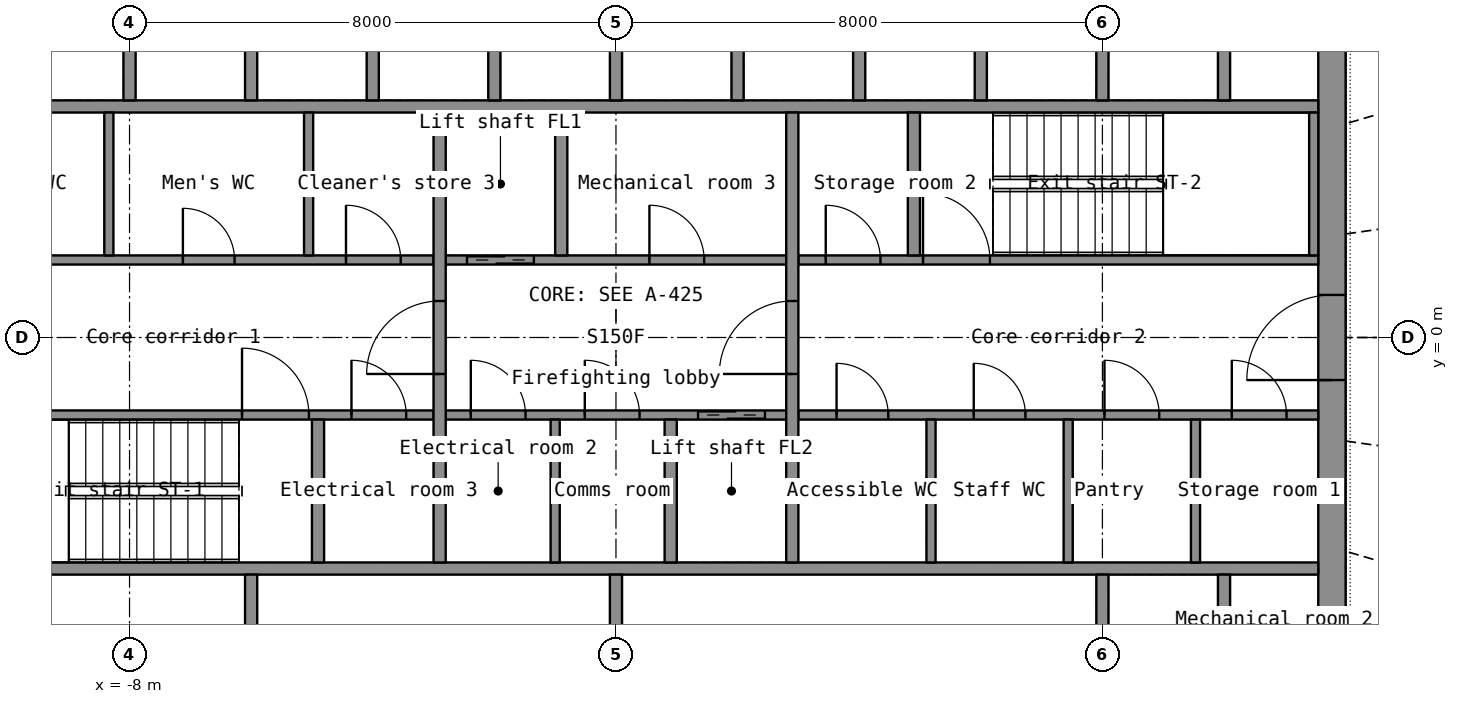
"""IFC4 building model, lengths in metres.
Left out: names, types, materials, properties, quantities, classifications, styles, units other than length and angle.
Written with IfcOpenShell. Run it as: python <this file> out.ifc"""

import sys

from ifc_helpers import new_model, si_unit, direction, frame, frame_2d, origin, place, context, subcontext, project, spatial, rectangle, extrude, element, fill, save


model = new_model("IFC4")
c1 = context("Model", 3, precision=1e-05, world=origin(), true_north=direction((0.0, 1.0)))
c2 = subcontext(c1, "Body", "Model", "MODEL_VIEW")
j1 = project(units=[si_unit("LENGTHUNIT", "METRE"), si_unit("PLANEANGLEUNIT", "RADIAN")], contexts=[c1])
p1 = place(None, origin())
s1 = spatial("IfcSite", under=j1, at=p1, CompositionType="ELEMENT")
p2 = place(p1, origin())
s2 = spatial("IfcBuilding", under=s1, at=p2, CompositionType="ELEMENT")
p3 = place(p2, frame((0.0, 0.0, 194.1)))
s3 = spatial("IfcBuildingStorey", under=s2, at=p3, CompositionType="ELEMENT", Elevation=194.1)
p4 = place(p3, frame((11.775, -7.2, 0.0), z_axis=(0.0, 0.0, 1.0), x_axis=(0.0, 1.0, 0.0)))
e1 = element("IfcWall", 1, at=p4, inside=s3, PredefinedType="SHEAR", context=c2, shape_type="SweptSolid", body=[
    extrude(rectangle(XDim=14.4, YDim=0.45, at=frame_2d((7.2, 0.0))), origin(), (0.0, 0.0, 1.0), 3.3),
])
p5 = place(p4, frame((6.5, 0.0, 0.0)))
e2 = element("IfcOpeningElement", 2, at=p5, cuts=e1, PredefinedType="OPENING", context=c2, shape_type="SweptSolid", body=[
    extrude(rectangle(XDim=1.4, YDim=2.2, at=frame_2d((0.7, 1.1))), frame((0.0, 0.235, 0.0), z_axis=(0.0, -1.0, 0.0), x_axis=(1.0, 0.0, 0.0)), (0.0, 0.0, 1.0), 0.47),
])
for number, where, z_axis, x_axis in (
    (3, (-11.55, -3.8, 0.0), (0.0, 0.0, 1.0), (1.0, 0.0, 0.0)),
    (4, (-11.55, 3.8, 0.0), (0.0, 0.0, 1.0), (1.0, 0.0, 0.0)),
):
    element("IfcWall", number, at=place(p3, frame(where, z_axis=z_axis, x_axis=x_axis)), inside=s3, PredefinedType="SHEAR", context=c2, shape_type="SweptSolid", body=[
        extrude(rectangle(XDim=23.1, YDim=0.2, at=frame_2d((11.55, 0.0))), origin(), (0.0, 0.0, 1.0), 3.3),
    ])
for number, where, z_axis, x_axis in (
    (5, (8.0, -6.75, 0.0), (0.0, 0.0, 1.0), (0.0, 1.0, 0.0)),
    (6, (10.0, -6.75, 0.0), (0.0, 0.0, 1.0), (0.0, 1.0, 0.0)),
):
    element("IfcWall", number, at=place(p3, frame(where, z_axis=z_axis, x_axis=x_axis)), inside=s3, PredefinedType="SHEAR", context=c2, shape_type="SweptSolid", body=[
        extrude(rectangle(XDim=2.85, YDim=0.2, at=frame_2d((1.425, 0.0))), origin(), (0.0, 0.0, 1.0), 3.3),
    ])
for number, where, z_axis, x_axis in (
    (7, (-6.0, -6.75, 0.0), (0.0, 0.0, 1.0), (0.0, 1.0, 0.0)),
    (8, (0.0, -6.75, 0.0), (0.0, 0.0, 1.0), (0.0, 1.0, 0.0)),
):
    element("IfcWall", number, at=place(p3, frame(where, z_axis=z_axis, x_axis=x_axis)), inside=s3, PredefinedType="PARTITIONING", context=c2, shape_type="SweptSolid", body=[
        extrude(rectangle(XDim=2.85, YDim=0.2, at=frame_2d((1.425, 0.0))), origin(), (0.0, 0.0, 1.0), 3.3),
    ])
for number, where, z_axis, x_axis in (
    (9, (-8.0, 3.9, 0.0), (0.0, 0.0, 1.0), (0.0, 1.0, 0.0)),
    (10, (-6.0, 3.9, 0.0), (0.0, 0.0, 1.0), (0.0, 1.0, 0.0)),
    (11, (-4.0, 3.9, 0.0), (0.0, 0.0, 1.0), (0.0, 1.0, 0.0)),
    (12, (-2.0, 3.9, 0.0), (0.0, 0.0, 1.0), (0.0, 1.0, 0.0)),
    (13, (0.0, 3.9, 0.0), (0.0, 0.0, 1.0), (0.0, 1.0, 0.0)),
    (14, (2.0, 3.9, 0.0), (0.0, 0.0, 1.0), (0.0, 1.0, 0.0)),
    (15, (4.0, 3.9, 0.0), (0.0, 0.0, 1.0), (0.0, 1.0, 0.0)),
    (16, (6.0, 3.9, 0.0), (0.0, 0.0, 1.0), (0.0, 1.0, 0.0)),
    (17, (8.0, 3.9, 0.0), (0.0, 0.0, 1.0), (0.0, 1.0, 0.0)),
    (18, (10.0, 3.9, 0.0), (0.0, 0.0, 1.0), (0.0, 1.0, 0.0)),
):
    element("IfcWall", number, at=place(p3, frame(where, z_axis=z_axis, x_axis=x_axis)), inside=s3, PredefinedType="SHEAR", context=c2, shape_type="SweptSolid", body=[
        extrude(rectangle(XDim=2.85, YDim=0.2, at=frame_2d((1.425, 0.0))), origin(), (0.0, 0.0, 1.0), 3.3),
    ])
p6 = place(p3, frame((-11.55, -1.275, 0.0), z_axis=(0.0, 0.0, 1.0), x_axis=(1.0, 0.0, 0.0)))
e19 = element("IfcWall", 19, at=p6, inside=s3, PredefinedType="SHEAR", context=c2, shape_type="SweptSolid", body=[
    extrude(rectangle(XDim=8.55, YDim=0.15, at=frame_2d((4.275, 0.0))), origin(), (0.0, 0.0, 1.0), 3.3),
])
p7 = place(p6, frame((5.4, 0.0, 0.0)))
e20 = element("IfcOpeningElement", 20, at=p7, cuts=e19, PredefinedType="OPENING", context=c2, shape_type="SweptSolid", body=[
    extrude(rectangle(XDim=1.1, YDim=2.15, at=frame_2d((0.55, 1.075))), frame((0.0, 0.085, 0.0), z_axis=(0.0, -1.0, 0.0), x_axis=(1.0, 0.0, 0.0)), (0.0, 0.0, 1.0), 0.17),
])
p8 = place(p6, frame((7.2, 0.0, 0.0)))
e21 = element("IfcOpeningElement", 21, at=p8, cuts=e19, PredefinedType="OPENING", context=c2, shape_type="SweptSolid", body=[
    extrude(rectangle(XDim=0.9, YDim=2.1, at=frame_2d((0.45, 1.05))), frame((0.0, 0.085, 0.0), z_axis=(0.0, -1.0, 0.0), x_axis=(1.0, 0.0, 0.0)), (0.0, 0.0, 1.0), 0.17),
])
p9 = place(p3, frame((-2.8, -1.275, 0.0), z_axis=(0.0, 0.0, 1.0), x_axis=(1.0, 0.0, 0.0)))
e22 = element("IfcWall", 22, at=p9, inside=s3, PredefinedType="SHEAR", context=c2, shape_type="SweptSolid", body=[
    extrude(rectangle(XDim=5.6, YDim=0.15, at=frame_2d((2.8, 0.0))), origin(), (0.0, 0.0, 1.0), 3.3),
])
p10 = place(p9, frame((4.15, 0.0, 0.0)))
e23 = element("IfcOpeningElement", 23, at=p10, cuts=e22, PredefinedType="OPENING", context=c2, shape_type="SweptSolid", body=[
    extrude(rectangle(XDim=1.1, YDim=2.2, at=frame_2d((0.55, 1.1))), frame((0.0, 0.085, 0.0), z_axis=(0.0, -1.0, 0.0), x_axis=(1.0, 0.0, 0.0)), (0.0, 0.0, 1.0), 0.17),
])
p11 = place(p9, frame((0.413, 0.0, 0.0)))
e24 = element("IfcOpeningElement", 24, at=p11, cuts=e22, PredefinedType="OPENING", context=c2, shape_type="SweptSolid", body=[
    extrude(rectangle(XDim=0.9, YDim=2.1, at=frame_2d((0.45, 1.05))), frame((0.0, 0.085, 0.0), z_axis=(0.0, -1.0, 0.0), x_axis=(1.0, 0.0, 0.0)), (0.0, 0.0, 1.0), 0.17),
])
p12 = place(p9, frame((2.288, 0.0, 0.0)))
e25 = element("IfcOpeningElement", 25, at=p12, cuts=e22, PredefinedType="OPENING", context=c2, shape_type="SweptSolid", body=[
    extrude(rectangle(XDim=0.9, YDim=2.1, at=frame_2d((0.45, 1.05))), frame((0.0, 0.085, 0.0), z_axis=(0.0, -1.0, 0.0), x_axis=(1.0, 0.0, 0.0)), (0.0, 0.0, 1.0), 0.17),
])
p13 = place(p3, frame((3.0, -1.275, 0.0), z_axis=(0.0, 0.0, 1.0), x_axis=(1.0, 0.0, 0.0)))
e26 = element("IfcWall", 26, at=p13, inside=s3, PredefinedType="PARTITIONING", context=c2, shape_type="SweptSolid", body=[
    extrude(rectangle(XDim=8.55, YDim=0.15, at=frame_2d((4.275, 0.0))), origin(), (0.0, 0.0, 1.0), 3.3),
])
p14 = place(p13, frame((0.628, 0.0, 0.0)))
e27 = element("IfcOpeningElement", 27, at=p14, cuts=e26, PredefinedType="OPENING", context=c2, shape_type="SweptSolid", body=[
    extrude(rectangle(XDim=0.85, YDim=2.1, at=frame_2d((0.425, 1.05))), frame((0.0, 0.085, 0.0), z_axis=(0.0, -1.0, 0.0), x_axis=(1.0, 0.0, 0.0)), (0.0, 0.0, 1.0), 0.17),
])
p15 = place(p13, frame((2.884, 0.0, 0.0)))
e28 = element("IfcOpeningElement", 28, at=p15, cuts=e26, PredefinedType="OPENING", context=c2, shape_type="SweptSolid", body=[
    extrude(rectangle(XDim=0.85, YDim=2.1, at=frame_2d((0.425, 1.05))), frame((0.0, 0.085, 0.0), z_axis=(0.0, -1.0, 0.0), x_axis=(1.0, 0.0, 0.0)), (0.0, 0.0, 1.0), 0.17),
])
p16 = place(p13, frame((5.034, 0.0, 0.0)))
e29 = element("IfcOpeningElement", 29, at=p16, cuts=e26, PredefinedType="OPENING", context=c2, shape_type="SweptSolid", body=[
    extrude(rectangle(XDim=0.9, YDim=2.1, at=frame_2d((0.45, 1.05))), frame((0.0, 0.085, 0.0), z_axis=(0.0, -1.0, 0.0), x_axis=(1.0, 0.0, 0.0)), (0.0, 0.0, 1.0), 0.17),
])
p17 = place(p13, frame((7.128, 0.0, 0.0)))
e30 = element("IfcOpeningElement", 30, at=p17, cuts=e26, PredefinedType="OPENING", context=c2, shape_type="SweptSolid", body=[
    extrude(rectangle(XDim=0.9, YDim=2.1, at=frame_2d((0.45, 1.05))), frame((0.0, 0.085, 0.0), z_axis=(0.0, -1.0, 0.0), x_axis=(1.0, 0.0, 0.0)), (0.0, 0.0, 1.0), 0.17),
])
p18 = place(p3, frame((-11.55, 1.275, 0.0), z_axis=(0.0, 0.0, 1.0), x_axis=(1.0, 0.0, 0.0)))
e31 = element("IfcWall", 31, at=p18, inside=s3, PredefinedType="PARTITIONING", context=c2, shape_type="SweptSolid", body=[
    extrude(rectangle(XDim=8.55, YDim=0.15, at=frame_2d((4.275, 0.0))), origin(), (0.0, 0.0, 1.0), 3.3),
])
p19 = place(p18, frame((1.143, 0.0, 0.0)))
e32 = element("IfcOpeningElement", 32, at=p19, cuts=e31, PredefinedType="OPENING", context=c2, shape_type="SweptSolid", body=[
    extrude(rectangle(XDim=0.85, YDim=2.1, at=frame_2d((0.425, 1.05))), frame((0.0, 0.085, 0.0), z_axis=(0.0, -1.0, 0.0), x_axis=(1.0, 0.0, 0.0)), (0.0, 0.0, 1.0), 0.17),
])
p20 = place(p18, frame((4.427, 0.0, 0.0)))
e33 = element("IfcOpeningElement", 33, at=p20, cuts=e31, PredefinedType="OPENING", context=c2, shape_type="SweptSolid", body=[
    extrude(rectangle(XDim=0.85, YDim=2.1, at=frame_2d((0.425, 1.05))), frame((0.0, 0.085, 0.0), z_axis=(0.0, -1.0, 0.0), x_axis=(1.0, 0.0, 0.0)), (0.0, 0.0, 1.0), 0.17),
])
p21 = place(p18, frame((7.11, 0.0, 0.0)))
e34 = element("IfcOpeningElement", 34, at=p21, cuts=e31, PredefinedType="OPENING", context=c2, shape_type="SweptSolid", body=[
    extrude(rectangle(XDim=0.9, YDim=2.1, at=frame_2d((0.45, 1.05))), frame((0.0, 0.085, 0.0), z_axis=(0.0, -1.0, 0.0), x_axis=(1.0, 0.0, 0.0)), (0.0, 0.0, 1.0), 0.17),
])
p22 = place(p3, frame((-2.8, 1.275, 0.0), z_axis=(0.0, 0.0, 1.0), x_axis=(1.0, 0.0, 0.0)))
e35 = element("IfcWall", 35, at=p22, inside=s3, PredefinedType="SHEAR", context=c2, shape_type="SweptSolid", body=[
    extrude(rectangle(XDim=5.6, YDim=0.15, at=frame_2d((2.8, 0.0))), origin(), (0.0, 0.0, 1.0), 3.3),
])
p23 = place(p22, frame((0.35, 0.0, 0.0)))
e36 = element("IfcOpeningElement", 36, at=p23, cuts=e35, PredefinedType="OPENING", context=c2, shape_type="SweptSolid", body=[
    extrude(rectangle(XDim=1.1, YDim=2.2, at=frame_2d((0.55, 1.1))), frame((0.0, 0.085, 0.0), z_axis=(0.0, -1.0, 0.0), x_axis=(1.0, 0.0, 0.0)), (0.0, 0.0, 1.0), 0.17),
])
p24 = place(p22, frame((3.35, 0.0, 0.0)))
e37 = element("IfcOpeningElement", 37, at=p24, cuts=e35, PredefinedType="OPENING", context=c2, shape_type="SweptSolid", body=[
    extrude(rectangle(XDim=0.9, YDim=2.1, at=frame_2d((0.45, 1.05))), frame((0.0, 0.085, 0.0), z_axis=(0.0, -1.0, 0.0), x_axis=(1.0, 0.0, 0.0)), (0.0, 0.0, 1.0), 0.17),
])
p25 = place(p3, frame((3.0, 1.275, 0.0), z_axis=(0.0, 0.0, 1.0), x_axis=(1.0, 0.0, 0.0)))
e38 = element("IfcWall", 38, at=p25, inside=s3, PredefinedType="SHEAR", context=c2, shape_type="SweptSolid", body=[
    extrude(rectangle(XDim=8.55, YDim=0.15, at=frame_2d((4.275, 0.0))), origin(), (0.0, 0.0, 1.0), 3.3),
])
p26 = place(p25, frame((2.05, 0.0, 0.0)))
e39 = element("IfcOpeningElement", 39, at=p26, cuts=e38, PredefinedType="OPENING", context=c2, shape_type="SweptSolid", body=[
    extrude(rectangle(XDim=1.1, YDim=2.15, at=frame_2d((0.55, 1.075))), frame((0.0, 0.085, 0.0), z_axis=(0.0, -1.0, 0.0), x_axis=(1.0, 0.0, 0.0)), (0.0, 0.0, 1.0), 0.17),
])
p27 = place(p25, frame((0.45, 0.0, 0.0)))
e40 = element("IfcOpeningElement", 40, at=p27, cuts=e38, PredefinedType="OPENING", context=c2, shape_type="SweptSolid", body=[
    extrude(rectangle(XDim=0.9, YDim=2.1, at=frame_2d((0.45, 1.05))), frame((0.0, 0.085, 0.0), z_axis=(0.0, -1.0, 0.0), x_axis=(1.0, 0.0, 0.0)), (0.0, 0.0, 1.0), 0.17),
])
p28 = place(p3, frame((-2.9, -3.7, 0.0), z_axis=(0.0, 0.0, 1.0), x_axis=(0.0, 1.0, 0.0)))
e41 = element("IfcWall", 41, at=p28, inside=s3, PredefinedType="SHEAR", context=c2, shape_type="SweptSolid", body=[
    extrude(rectangle(XDim=7.4, YDim=0.2, at=frame_2d((3.7, 0.0))), origin(), (0.0, 0.0, 1.0), 3.3),
])
p29 = place(p28, frame((3.1, 0.0, 0.0)))
e42 = element("IfcOpeningElement", 42, at=p29, cuts=e41, PredefinedType="OPENING", context=c2, shape_type="SweptSolid", body=[
    extrude(rectangle(XDim=1.2, YDim=2.2, at=frame_2d((0.6, 1.1))), frame((0.0, 0.11, 0.0), z_axis=(0.0, -1.0, 0.0), x_axis=(1.0, 0.0, 0.0)), (0.0, 0.0, 1.0), 0.22),
])
p30 = place(p3, frame((2.9, -3.7, 0.0), z_axis=(0.0, 0.0, 1.0), x_axis=(0.0, 1.0, 0.0)))
e43 = element("IfcWall", 43, at=p30, inside=s3, PredefinedType="SHEAR", context=c2, shape_type="SweptSolid", body=[
    extrude(rectangle(XDim=7.4, YDim=0.2, at=frame_2d((3.7, 0.0))), origin(), (0.0, 0.0, 1.0), 3.3),
])
p31 = place(p30, frame((3.1, 0.0, 0.0)))
e44 = element("IfcOpeningElement", 44, at=p31, cuts=e43, PredefinedType="OPENING", context=c2, shape_type="SweptSolid", body=[
    extrude(rectangle(XDim=1.2, YDim=2.2, at=frame_2d((0.6, 1.1))), frame((0.0, 0.11, 0.0), z_axis=(0.0, -1.0, 0.0), x_axis=(1.0, 0.0, 0.0)), (0.0, 0.0, 1.0), 0.22),
])
for number, where, z_axis, x_axis in (
    (45, (-0.9, 1.35, 0.0), (0.0, 0.0, 1.0), (0.0, 1.0, 0.0)),
    (46, (0.9, -3.7, 0.0), (0.0, 0.0, 1.0), (0.0, 1.0, 0.0)),
):
    element("IfcWall", number, at=place(p3, frame(where, z_axis=z_axis, x_axis=x_axis)), inside=s3, PredefinedType="SHEAR", context=c2, shape_type="SweptSolid", body=[
        extrude(rectangle(XDim=2.35, YDim=0.2, at=frame_2d((1.175, 0.0))), origin(), (0.0, 0.0, 1.0), 3.3),
    ])
p32 = place(p3, frame((11.475, 1.35, 0.0), z_axis=(0.0, 0.0, 1.0), x_axis=(0.0, 1.0, 0.0)))
e47 = element("IfcWall", 47, at=p32, inside=s3, PredefinedType="SHEAR", context=c2, shape_type="SweptSolid", body=[
    extrude(rectangle(XDim=2.35, YDim=0.15, at=frame_2d((1.175, 0.0))), origin(), (0.0, 0.0, 1.0), 3.3),
])
for number, where, z_axis, x_axis in (
    (48, (-4.9, -3.7, 0.0), (0.0, 0.0, 1.0), (0.0, 1.0, 0.0)),
    (49, (4.9, 1.35, 0.0), (0.0, 0.0, 1.0), (0.0, 1.0, 0.0)),
):
    element("IfcWall", number, at=place(p3, frame(where, z_axis=z_axis, x_axis=x_axis)), inside=s3, PredefinedType="SHEAR", context=c2, shape_type="SweptSolid", body=[
        extrude(rectangle(XDim=2.35, YDim=0.2, at=frame_2d((1.175, 0.0))), origin(), (0.0, 0.0, 1.0), 3.3),
    ])
for number, where, z_axis, x_axis in (
    (50, (-8.34, 1.35, 0.0), (0.0, 0.0, 1.0), (0.0, 1.0, 0.0)),
    (51, (-5.055, 1.35, 0.0), (0.0, 0.0, 1.0), (0.0, 1.0, 0.0)),
    (52, (5.181, -3.7, 0.0), (0.0, 0.0, 1.0), (0.0, 1.0, 0.0)),
    (53, (7.437, -3.7, 0.0), (0.0, 0.0, 1.0), (0.0, 1.0, 0.0)),
    (54, (9.531, -3.7, 0.0), (0.0, 0.0, 1.0), (0.0, 1.0, 0.0)),
    (55, (-1.0, -3.7, 0.0), (0.0, 0.0, 1.0), (0.0, 1.0, 0.0)),
):
    element("IfcWall", number, at=place(p3, frame(where, z_axis=z_axis, x_axis=x_axis)), inside=s3, PredefinedType="PARTITIONING", context=c2, shape_type="SweptSolid", body=[
        extrude(rectangle(XDim=2.35, YDim=0.15, at=frame_2d((1.175, 0.0))), origin(), (0.0, 0.0, 1.0), 3.3),
    ])
p33 = place(p5, origin())
e56 = element("IfcDoor", 56, at=p33, inside=s3, OperationType="DOUBLE_DOOR_SINGLE_SWING", PredefinedType="DOOR", context=c2, shape_type="SweptSolid", body=[
    extrude(rectangle(XDim=1.4, YDim=2.2, at=frame_2d((0.7, 1.1))), frame((0.0, 0.025, 0.0), z_axis=(0.0, -1.0, 0.0), x_axis=(1.0, 0.0, 0.0)), (0.0, 0.0, 1.0), 0.05),
])
fill(e2, e56)
p34 = place(p29, origin())
e57 = element("IfcDoor", 57, at=p34, inside=s3, OperationType="SINGLE_SWING_LEFT", PredefinedType="DOOR", context=c2, shape_type="SweptSolid", body=[
    extrude(rectangle(XDim=1.2, YDim=2.2, at=frame_2d((0.6, 1.1))), frame((0.0, 0.025, 0.0), z_axis=(0.0, -1.0, 0.0), x_axis=(1.0, 0.0, 0.0)), (0.0, 0.0, 1.0), 0.05),
])
fill(e42, e57)
p35 = place(p31, origin())
e58 = element("IfcDoor", 58, at=p35, inside=s3, OperationType="SINGLE_SWING_LEFT", PredefinedType="DOOR", context=c2, shape_type="SweptSolid", body=[
    extrude(rectangle(XDim=1.2, YDim=2.2, at=frame_2d((0.6, 1.1))), frame((0.0, 0.025, 0.0), z_axis=(0.0, -1.0, 0.0), x_axis=(1.0, 0.0, 0.0)), (0.0, 0.0, 1.0), 0.05),
])
fill(e44, e58)
p36 = place(p23, origin())
e59 = element("IfcDoor", 59, at=p36, inside=s3, OperationType="DOUBLE_DOOR_SLIDING", PredefinedType="DOOR", context=c2, shape_type="SweptSolid", body=[
    extrude(rectangle(XDim=1.1, YDim=2.2, at=frame_2d((0.55, 1.1))), frame((0.0, 0.025, 0.0), z_axis=(0.0, -1.0, 0.0), x_axis=(1.0, 0.0, 0.0)), (0.0, 0.0, 1.0), 0.05),
])
fill(e36, e59)
p37 = place(p10, origin())
e60 = element("IfcDoor", 60, at=p37, inside=s3, OperationType="DOUBLE_DOOR_SLIDING", PredefinedType="DOOR", context=c2, shape_type="SweptSolid", body=[
    extrude(rectangle(XDim=1.1, YDim=2.2, at=frame_2d((0.55, 1.1))), frame((0.0, 0.025, 0.0), z_axis=(0.0, -1.0, 0.0), x_axis=(1.0, 0.0, 0.0)), (0.0, 0.0, 1.0), 0.05),
])
fill(e23, e60)
p38 = place(p7, origin())
e61 = element("IfcDoor", 61, at=p38, inside=s3, OperationType="SINGLE_SWING_LEFT", PredefinedType="DOOR", context=c2, shape_type="SweptSolid", body=[
    extrude(rectangle(XDim=1.1, YDim=2.15, at=frame_2d((0.55, 1.075))), frame((0.0, 0.025, 0.0), z_axis=(0.0, -1.0, 0.0), x_axis=(1.0, 0.0, 0.0)), (0.0, 0.0, 1.0), 0.05),
])
fill(e20, e61)
p39 = place(p26, origin())
e62 = element("IfcDoor", 62, at=p39, inside=s3, OperationType="SINGLE_SWING_LEFT", PredefinedType="DOOR", context=c2, shape_type="SweptSolid", body=[
    extrude(rectangle(XDim=1.1, YDim=2.15, at=frame_2d((0.55, 1.075))), frame((0.0, 0.025, 0.0), z_axis=(0.0, -1.0, 0.0), x_axis=(1.0, 0.0, 0.0)), (0.0, 0.0, 1.0), 0.05),
])
fill(e39, e62)
p40 = place(p20, origin())
e63 = element("IfcDoor", 63, at=p40, inside=s3, OperationType="SINGLE_SWING_LEFT", PredefinedType="DOOR", context=c2, shape_type="SweptSolid", body=[
    extrude(rectangle(XDim=0.85, YDim=2.1, at=frame_2d((0.425, 1.05))), frame((0.0, 0.025, 0.0), z_axis=(0.0, -1.0, 0.0), x_axis=(1.0, 0.0, 0.0)), (0.0, 0.0, 1.0), 0.05),
])
fill(e33, e63)
p41 = place(p21, origin())
e64 = element("IfcDoor", 64, at=p41, inside=s3, OperationType="SINGLE_SWING_LEFT", PredefinedType="DOOR", context=c2, shape_type="SweptSolid", body=[
    extrude(rectangle(XDim=0.9, YDim=2.1, at=frame_2d((0.45, 1.05))), frame((0.0, 0.025, 0.0), z_axis=(0.0, -1.0, 0.0), x_axis=(1.0, 0.0, 0.0)), (0.0, 0.0, 1.0), 0.05),
])
fill(e34, e64)
p42 = place(p14, origin())
e65 = element("IfcDoor", 65, at=p42, inside=s3, OperationType="SINGLE_SWING_LEFT", PredefinedType="DOOR", context=c2, shape_type="SweptSolid", body=[
    extrude(rectangle(XDim=0.85, YDim=2.1, at=frame_2d((0.425, 1.05))), frame((0.0, 0.025, 0.0), z_axis=(0.0, -1.0, 0.0), x_axis=(1.0, 0.0, 0.0)), (0.0, 0.0, 1.0), 0.05),
])
fill(e27, e65)
p43 = place(p15, origin())
e66 = element("IfcDoor", 66, at=p43, inside=s3, OperationType="SINGLE_SWING_LEFT", PredefinedType="DOOR", context=c2, shape_type="SweptSolid", body=[
    extrude(rectangle(XDim=0.85, YDim=2.1, at=frame_2d((0.425, 1.05))), frame((0.0, 0.025, 0.0), z_axis=(0.0, -1.0, 0.0), x_axis=(1.0, 0.0, 0.0)), (0.0, 0.0, 1.0), 0.05),
])
fill(e28, e66)
p44 = place(p16, origin())
e67 = element("IfcDoor", 67, at=p44, inside=s3, OperationType="SINGLE_SWING_LEFT", PredefinedType="DOOR", context=c2, shape_type="SweptSolid", body=[
    extrude(rectangle(XDim=0.9, YDim=2.1, at=frame_2d((0.45, 1.05))), frame((0.0, 0.025, 0.0), z_axis=(0.0, -1.0, 0.0), x_axis=(1.0, 0.0, 0.0)), (0.0, 0.0, 1.0), 0.05),
])
fill(e29, e67)
p45 = place(p17, origin())
e68 = element("IfcDoor", 68, at=p45, inside=s3, OperationType="SINGLE_SWING_LEFT", PredefinedType="DOOR", context=c2, shape_type="SweptSolid", body=[
    extrude(rectangle(XDim=0.9, YDim=2.1, at=frame_2d((0.45, 1.05))), frame((0.0, 0.025, 0.0), z_axis=(0.0, -1.0, 0.0), x_axis=(1.0, 0.0, 0.0)), (0.0, 0.0, 1.0), 0.05),
])
fill(e30, e68)
p46 = place(p24, origin())
e69 = element("IfcDoor", 69, at=p46, inside=s3, OperationType="SINGLE_SWING_LEFT", PredefinedType="DOOR", context=c2, shape_type="SweptSolid", body=[
    extrude(rectangle(XDim=0.9, YDim=2.1, at=frame_2d((0.45, 1.05))), frame((0.0, 0.025, 0.0), z_axis=(0.0, -1.0, 0.0), x_axis=(1.0, 0.0, 0.0)), (0.0, 0.0, 1.0), 0.05),
])
fill(e37, e69)
p47 = place(p11, origin())
e70 = element("IfcDoor", 70, at=p47, inside=s3, OperationType="SINGLE_SWING_LEFT", PredefinedType="DOOR", context=c2, shape_type="SweptSolid", body=[
    extrude(rectangle(XDim=0.9, YDim=2.1, at=frame_2d((0.45, 1.05))), frame((0.0, 0.025, 0.0), z_axis=(0.0, -1.0, 0.0), x_axis=(1.0, 0.0, 0.0)), (0.0, 0.0, 1.0), 0.05),
])
fill(e24, e70)
p48 = place(p12, origin())
e71 = element("IfcDoor", 71, at=p48, inside=s3, OperationType="SINGLE_SWING_LEFT", PredefinedType="DOOR", context=c2, shape_type="SweptSolid", body=[
    extrude(rectangle(XDim=0.9, YDim=2.1, at=frame_2d((0.45, 1.05))), frame((0.0, 0.025, 0.0), z_axis=(0.0, -1.0, 0.0), x_axis=(1.0, 0.0, 0.0)), (0.0, 0.0, 1.0), 0.05),
])
fill(e25, e71)
p49 = place(p27, origin())
e72 = element("IfcDoor", 72, at=p49, inside=s3, OperationType="SINGLE_SWING_LEFT", PredefinedType="DOOR", context=c2, shape_type="SweptSolid", body=[
    extrude(rectangle(XDim=0.9, YDim=2.1, at=frame_2d((0.45, 1.05))), frame((0.0, 0.025, 0.0), z_axis=(0.0, -1.0, 0.0), x_axis=(1.0, 0.0, 0.0)), (0.0, 0.0, 1.0), 0.05),
])
fill(e40, e72)
p50 = place(p8, origin())
e73 = element("IfcDoor", 73, at=p50, inside=s3, OperationType="SINGLE_SWING_LEFT", PredefinedType="DOOR", context=c2, shape_type="SweptSolid", body=[
    extrude(rectangle(XDim=0.9, YDim=2.1, at=frame_2d((0.45, 1.05))), frame((0.0, 0.025, 0.0), z_axis=(0.0, -1.0, 0.0), x_axis=(1.0, 0.0, 0.0)), (0.0, 0.0, 1.0), 0.05),
])
fill(e21, e73)
save(model, sys.argv[1])
